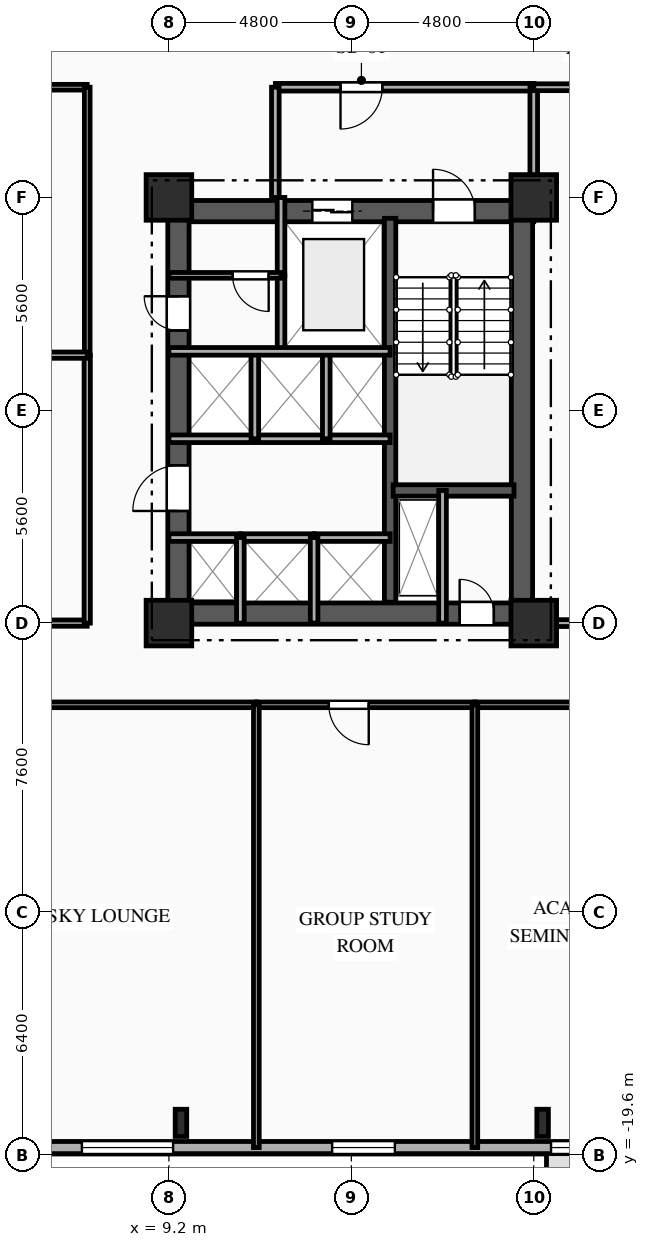
"""IFC4 building model, lengths in metres.
Left out: names, types, materials, properties, quantities, classifications, styles, units other than length and angle.
Written with IfcOpenShell. Run it as: python <this file> out.ifc"""

import sys

from ifc_helpers import new_model, si_unit, direction, frame, frame_2d, origin, origin_2d, place, context, subcontext, project, spatial, rectangle, i_section, extrude, element, fill, save


model = new_model("IFC4")
c1 = context("Model", 3, precision=1e-05, world=origin(), true_north=direction((0.0, 1.0)))
c2 = subcontext(c1, "Body", "Model", "MODEL_VIEW")
j1 = project(units=[si_unit("LENGTHUNIT", "METRE"), si_unit("PLANEANGLEUNIT", "RADIAN")], contexts=[c1])
p1 = place(None, origin())
s1 = spatial("IfcSite", under=j1, at=p1, CompositionType="ELEMENT")
p2 = place(p1, origin())
s2 = spatial("IfcBuilding", under=s1, at=p2, CompositionType="ELEMENT")
p3 = place(p2, frame((0.0, 0.0, 50.45)))
s3 = spatial("IfcBuildingStorey", under=s2, at=p3, CompositionType="ELEMENT", Elevation=50.45)
for number, where, z_axis, x_axis in (
    (1, (9.2, -5.6, 0.0), (0.0, 0.0, 1.0), (1.0, 0.0, 0.0)),
    (2, (9.2, 5.6, 0.0), (0.0, 0.0, 1.0), (1.0, 0.0, 0.0)),
    (3, (18.8, -5.6, 0.0), (0.0, 0.0, 1.0), (1.0, 0.0, 0.0)),
    (4, (18.8, 5.6, 0.0), (0.0, 0.0, 1.0), (1.0, 0.0, 0.0)),
):
    element("IfcColumn", number, at=place(p3, frame(where, z_axis=z_axis, x_axis=x_axis)), inside=s3, PredefinedType="COLUMN", context=c2, shape_type="SweptSolid", body=[
        extrude(rectangle(XDim=1.2, YDim=1.2, at=origin_2d()), origin(), (0.0, 0.0, 1.0), 3.35),
    ])
for number, where, z_axis, x_axis in (
    (5, (9.517, -18.75, 0.0), (0.0, 0.0, 1.0), (1.0, 0.0, 0.0)),
    (6, (19.033, -18.75, 0.0), (0.0, 0.0, 1.0), (1.0, 0.0, 0.0)),
):
    element("IfcColumn", number, at=place(p3, frame(where, z_axis=z_axis, x_axis=x_axis)), inside=s3, PredefinedType="COLUMN", context=c2, shape_type="SweptSolid", body=[
        extrude(i_section(OverallWidth=0.304, OverallDepth=0.716, WebThickness=0.021, FlangeThickness=0.04, FilletRadius=0.027, at=origin_2d()), origin(), (0.0, 0.0, 1.0), 3.35),
    ])
p4 = place(p3, frame((29.2, -19.4, 0.0), z_axis=(0.0, 0.0, 1.0), x_axis=(-1.0, 0.0, 0.0)))
e7 = element("IfcWall", 7, at=p4, inside=s3, PredefinedType="SOLIDWALL", context=c2, shape_type="SweptSolid", body=[
    extrude(rectangle(XDim=23.6, YDim=0.32, at=frame_2d((11.8, 0.0))), origin(), (0.0, 0.0, 1.0), 3.035),
])
p5 = place(p4, frame((8.295, 0.0, 0.85)))
e8 = element("IfcOpeningElement", 8, at=p5, cuts=e7, PredefinedType="OPENING", context=c2, shape_type="SweptSolid", body=[
    extrude(rectangle(XDim=1.65, YDim=1.85, at=frame_2d((0.825, 0.925))), frame((0.0, 0.17, 0.0), z_axis=(0.0, -1.0, 0.0), x_axis=(1.0, 0.0, 0.0)), (0.0, 0.0, 1.0), 0.34),
])
p6 = place(p4, frame((14.055, 0.0, 0.85)))
e9 = element("IfcOpeningElement", 9, at=p6, cuts=e7, PredefinedType="OPENING", context=c2, shape_type="SweptSolid", body=[
    extrude(rectangle(XDim=1.65, YDim=1.85, at=frame_2d((0.825, 0.925))), frame((0.0, 0.17, 0.0), z_axis=(0.0, -1.0, 0.0), x_axis=(1.0, 0.0, 0.0)), (0.0, 0.0, 1.0), 0.34),
])
p7 = place(p4, frame((19.89, 0.0, 0.85)))
e10 = element("IfcOpeningElement", 10, at=p7, cuts=e7, PredefinedType="OPENING", context=c2, shape_type="SweptSolid", body=[
    extrude(rectangle(XDim=2.4, YDim=1.95, at=frame_2d((1.2, 0.975))), frame((0.0, 0.17, 0.0), z_axis=(0.0, -1.0, 0.0), x_axis=(1.0, 0.0, 0.0)), (0.0, 0.0, 1.0), 0.34),
])
p8 = place(p3, frame((9.2, 5.24, 0.0), z_axis=(0.0, 0.0, 1.0), x_axis=(1.0, 0.0, 0.0)))
e11 = element("IfcWall", 11, at=p8, inside=s3, PredefinedType="SHEAR", context=c2, shape_type="SweptSolid", body=[
    extrude(rectangle(XDim=9.6, YDim=0.56, at=frame_2d((4.8, 0.0))), origin(), (0.0, 0.0, 1.0), 3.035),
])
p9 = place(p8, frame((6.95, 0.0, 0.0)))
e12 = element("IfcOpeningElement", 12, at=p9, cuts=e11, PredefinedType="OPENING", context=c2, shape_type="SweptSolid", body=[
    extrude(rectangle(XDim=1.1, YDim=2.15, at=frame_2d((0.55, 1.075))), frame((0.0, 0.29, 0.0), z_axis=(0.0, -1.0, 0.0), x_axis=(1.0, 0.0, 0.0)), (0.0, 0.0, 1.0), 0.58),
])
p10 = place(p8, frame((3.775, 0.0, 0.0)))
e13 = element("IfcOpeningElement", 13, at=p10, cuts=e11, PredefinedType="OPENING", context=c2, shape_type="SweptSolid", body=[
    extrude(rectangle(XDim=1.05, YDim=2.1, at=frame_2d((0.525, 1.05))), frame((0.0, 0.29, 0.0), z_axis=(0.0, -1.0, 0.0), x_axis=(1.0, 0.0, 0.0)), (0.0, 0.0, 1.0), 0.58),
])
p11 = place(p3, frame((9.2, -5.35, 0.0), z_axis=(0.0, 0.0, 1.0), x_axis=(1.0, 0.0, 0.0)))
e14 = element("IfcWall", 14, at=p11, inside=s3, PredefinedType="SHEAR", context=c2, shape_type="SweptSolid", body=[
    extrude(rectangle(XDim=9.6, YDim=0.56, at=frame_2d((4.8, 0.0))), origin(), (0.0, 0.0, 1.0), 3.035),
])
p12 = place(p11, frame((7.65, 0.0, 0.0)))
e15 = element("IfcOpeningElement", 15, at=p12, cuts=e14, PredefinedType="OPENING", context=c2, shape_type="SweptSolid", body=[
    extrude(rectangle(XDim=0.9, YDim=2.1, at=frame_2d((0.45, 1.05))), frame((0.0, 0.29, 0.0), z_axis=(0.0, -1.0, 0.0), x_axis=(1.0, 0.0, 0.0)), (0.0, 0.0, 1.0), 0.58),
])
p13 = place(p3, frame((9.45, -5.05, 0.0), z_axis=(0.0, 0.0, 1.0), x_axis=(0.0, 1.0, 0.0)))
e16 = element("IfcWall", 16, at=p13, inside=s3, PredefinedType="SHEAR", context=c2, shape_type="SweptSolid", body=[
    extrude(rectangle(XDim=10.1, YDim=0.56, at=frame_2d((5.05, 0.0))), origin(), (0.0, 0.0, 1.0), 3.035),
])
p14 = place(p13, frame((7.15, 0.0, 0.0)))
e17 = element("IfcOpeningElement", 17, at=p14, cuts=e16, PredefinedType="OPENING", context=c2, shape_type="SweptSolid", body=[
    extrude(rectangle(XDim=0.9, YDim=2.1, at=frame_2d((0.45, 1.05))), frame((0.0, 0.29, 0.0), z_axis=(0.0, -1.0, 0.0), x_axis=(1.0, 0.0, 0.0)), (0.0, 0.0, 1.0), 0.58),
])
p15 = place(p13, frame((2.4, 0.0, 0.0)))
e18 = element("IfcOpeningElement", 18, at=p15, cuts=e16, PredefinedType="OPENING", context=c2, shape_type="SweptSolid", body=[
    extrude(rectangle(XDim=1.2, YDim=2.15, at=frame_2d((0.6, 1.075))), frame((0.0, 0.29, 0.0), z_axis=(0.0, -1.0, 0.0), x_axis=(1.0, 0.0, 0.0)), (0.0, 0.0, 1.0), 0.58),
])
p16 = place(p3, frame((18.49, -5.05, 0.0), z_axis=(0.0, 0.0, 1.0), x_axis=(0.0, 1.0, 0.0)))
e19 = element("IfcWall", 19, at=p16, inside=s3, PredefinedType="SHEAR", context=c2, shape_type="SweptSolid", body=[
    extrude(rectangle(XDim=10.1, YDim=0.56, at=frame_2d((5.05, 0.0))), origin(), (0.0, 0.0, 1.0), 3.035),
])
p17 = place(p3, frame((15.02, -5.05, 0.0), z_axis=(0.0, 0.0, 1.0), x_axis=(0.0, 1.0, 0.0)))
e20 = element("IfcWall", 20, at=p17, inside=s3, PredefinedType="SHEAR", context=c2, shape_type="SweptSolid", body=[
    extrude(rectangle(XDim=10.1, YDim=0.3, at=frame_2d((5.05, 0.0))), origin(), (0.0, 0.0, 1.0), 3.035),
])
p18 = place(p3, frame((15.1, -2.11, 0.0), z_axis=(0.0, 0.0, 1.0), x_axis=(1.0, 0.0, 0.0)))
e21 = element("IfcWall", 21, at=p18, inside=s3, PredefinedType="SHEAR", context=c2, shape_type="SweptSolid", body=[
    extrude(rectangle(XDim=3.18, YDim=0.3, at=frame_2d((1.59, 0.0))), origin(), (0.0, 0.0, 1.0), 3.035),
])
p19 = place(p3, frame((16.4, -2.11, 0.0), z_axis=(0.0, 0.0, 1.0), x_axis=(0.0, -1.0, 0.0)))
e22 = element("IfcWall", 22, at=p19, inside=s3, PredefinedType="PARTITIONING", context=c2, shape_type="SweptSolid", body=[
    extrude(rectangle(XDim=3.49, YDim=0.2, at=frame_2d((1.745, 0.0))), origin(), (0.0, 0.0, 1.0), 3.035),
])
p20 = place(p3, frame((12.15, 3.55, 0.0), z_axis=(0.0, 0.0, 1.0), x_axis=(0.0, -1.0, 0.0)))
e23 = element("IfcWall", 23, at=p20, inside=s3, PredefinedType="PARTITIONING", context=c2, shape_type="SweptSolid", body=[
    extrude(rectangle(XDim=2.0, YDim=0.2, at=frame_2d((1.0, 0.0))), origin(), (0.0, 0.0, 1.0), 3.035),
])
p21 = place(p3, frame((12.15, 5.6, 0.0), z_axis=(0.0, 0.0, 1.0), x_axis=(0.0, -1.0, 0.0)))
e24 = element("IfcWall", 24, at=p21, inside=s3, PredefinedType="PARTITIONING", context=c2, shape_type="SweptSolid", body=[
    extrude(rectangle(XDim=2.05, YDim=0.2, at=frame_2d((1.025, 0.0))), origin(), (0.0, 0.0, 1.0), 3.035),
])
p22 = place(p3, frame((18.8, 8.5, 0.0), z_axis=(0.0, 0.0, 1.0), x_axis=(-1.0, 0.0, 0.0)))
e25 = element("IfcWall", 25, at=p22, inside=s3, PredefinedType="PARTITIONING", context=c2, shape_type="SweptSolid", body=[
    extrude(rectangle(XDim=6.8, YDim=0.2, at=frame_2d((3.4, 0.0))), origin(), (0.0, 0.0, 1.0), 3.035),
])
p23 = place(p22, frame((3.985, 0.0, 0.0)))
e26 = element("IfcOpeningElement", 26, at=p23, cuts=e25, PredefinedType="OPENING", context=c2, shape_type="SweptSolid", body=[
    extrude(rectangle(XDim=1.1, YDim=2.15, at=frame_2d((0.55, 1.075))), frame((0.0, 0.11, 0.0), z_axis=(0.0, -1.0, 0.0), x_axis=(1.0, 0.0, 0.0)), (0.0, 0.0, 1.0), 0.22),
])
p24 = place(p3, frame((12.0, 8.5, 0.0), z_axis=(0.0, 0.0, 1.0), x_axis=(0.0, -1.0, 0.0)))
e27 = element("IfcWall", 27, at=p24, inside=s3, PredefinedType="PARTITIONING", context=c2, shape_type="SweptSolid", body=[
    extrude(rectangle(XDim=2.9, YDim=0.2, at=frame_2d((1.45, 0.0))), origin(), (0.0, 0.0, 1.0), 3.035),
])
p25 = place(p3, frame((18.8, 5.6, 0.0), z_axis=(0.0, 0.0, 1.0), x_axis=(0.0, 1.0, 0.0)))
e28 = element("IfcWall", 28, at=p25, inside=s3, PredefinedType="PARTITIONING", context=c2, shape_type="SweptSolid", body=[
    extrude(rectangle(XDim=2.9, YDim=0.2, at=frame_2d((1.45, 0.0))), origin(), (0.0, 0.0, 1.0), 2.52),
])
p26 = place(p3, frame((12.15, 3.55, 0.0), z_axis=(0.0, 0.0, 1.0), x_axis=(-1.0, 0.0, 0.0)))
e29 = element("IfcWall", 29, at=p26, inside=s3, PredefinedType="PARTITIONING", context=c2, shape_type="SweptSolid", body=[
    extrude(rectangle(XDim=2.95, YDim=0.15, at=frame_2d((1.475, 0.0))), origin(), (0.0, 0.0, 1.0), 3.035),
])
p27 = place(p26, frame((0.325, 0.0, 0.0)))
e30 = element("IfcOpeningElement", 30, at=p27, cuts=e29, PredefinedType="OPENING", context=c2, shape_type="SweptSolid", body=[
    extrude(rectangle(XDim=0.95, YDim=2.1, at=frame_2d((0.475, 1.05))), frame((0.0, 0.085, 0.0), z_axis=(0.0, -1.0, 0.0), x_axis=(1.0, 0.0, 0.0)), (0.0, 0.0, 1.0), 0.17),
])
p28 = place(p3, frame((9.2, -3.35, 0.0), z_axis=(0.0, 0.0, 1.0), x_axis=(1.0, 0.0, 0.0)))
e31 = element("IfcWall", 31, at=p28, inside=s3, PredefinedType="PARTITIONING", context=c2, shape_type="SweptSolid", body=[
    extrude(rectangle(XDim=1.88, YDim=0.2, at=frame_2d((0.94, 0.0))), origin(), (0.0, 0.0, 1.0), 2.75),
])
p29 = place(p3, frame((11.08, -3.35, 0.0), z_axis=(0.0, 0.0, 1.0), x_axis=(1.0, 0.0, 0.0)))
e32 = element("IfcWall", 32, at=p29, inside=s3, PredefinedType="PARTITIONING", context=c2, shape_type="SweptSolid", body=[
    extrude(rectangle(XDim=1.94, YDim=0.2, at=frame_2d((0.97, 0.0))), origin(), (0.0, 0.0, 1.0), 3.035),
])
p30 = place(p3, frame((13.02, -3.35, 0.0), z_axis=(0.0, 0.0, 1.0), x_axis=(1.0, 0.0, 0.0)))
e33 = element("IfcWall", 33, at=p30, inside=s3, PredefinedType="PARTITIONING", context=c2, shape_type="SweptSolid", body=[
    extrude(rectangle(XDim=2.0, YDim=0.2, at=frame_2d((1.0, 0.0))), origin(), (0.0, 0.0, 1.0), 3.035),
])
p31 = place(p3, frame((11.46, -0.75, 0.0), z_axis=(0.0, 0.0, 1.0), x_axis=(-1.0, 0.0, 0.0)))
e34 = element("IfcWall", 34, at=p31, inside=s3, PredefinedType="PARTITIONING", context=c2, shape_type="SweptSolid", body=[
    extrude(rectangle(XDim=2.26, YDim=0.2, at=frame_2d((1.13, 0.0))), origin(), (0.0, 0.0, 1.0), 3.035),
])
p32 = place(p3, frame((13.34, -0.75, 0.0), z_axis=(0.0, 0.0, 1.0), x_axis=(-1.0, 0.0, 0.0)))
e35 = element("IfcWall", 35, at=p32, inside=s3, PredefinedType="PARTITIONING", context=c2, shape_type="SweptSolid", body=[
    extrude(rectangle(XDim=1.88, YDim=0.2, at=frame_2d((0.94, 0.0))), origin(), (0.0, 0.0, 1.0), 3.035),
])
p33 = place(p3, frame((15.02, -0.75, 0.0), z_axis=(0.0, 0.0, 1.0), x_axis=(-1.0, 0.0, 0.0)))
e36 = element("IfcWall", 36, at=p33, inside=s3, PredefinedType="PARTITIONING", context=c2, shape_type="SweptSolid", body=[
    extrude(rectangle(XDim=1.68, YDim=0.2, at=frame_2d((0.84, 0.0))), origin(), (0.0, 0.0, 1.0), 3.035),
])
for number, where, z_axis, x_axis in (
    (37, (11.08, -5.6, 0.0), (0.0, 0.0, 1.0), (0.0, 1.0, 0.0)),
    (38, (13.02, -5.6, 0.0), (0.0, 0.0, 1.0), (0.0, 1.0, 0.0)),
):
    element("IfcWall", number, at=place(p3, frame(where, z_axis=z_axis, x_axis=x_axis)), inside=s3, PredefinedType="PARTITIONING", context=c2, shape_type="SweptSolid", body=[
        extrude(rectangle(XDim=2.25, YDim=0.2, at=frame_2d((1.125, 0.0))), origin(), (0.0, 0.0, 1.0), 3.035),
    ])
for number, where, z_axis, x_axis in (
    (39, (11.46, -0.75, 0.0), (0.0, 0.0, 1.0), (0.0, 1.0, 0.0)),
    (40, (13.34, -0.75, 0.0), (0.0, 0.0, 1.0), (0.0, 1.0, 0.0)),
):
    element("IfcWall", number, at=place(p3, frame(where, z_axis=z_axis, x_axis=x_axis)), inside=s3, PredefinedType="PARTITIONING", context=c2, shape_type="SweptSolid", body=[
        extrude(rectangle(XDim=2.3, YDim=0.2, at=frame_2d((1.15, 0.0))), origin(), (0.0, 0.0, 1.0), 3.035),
    ])
p34 = place(p3, frame((21.45, 8.5, 0.0), z_axis=(0.0, 0.0, 1.0), x_axis=(-1.0, 0.0, 0.0)))
e41 = element("IfcWall", 41, at=p34, inside=s3, PredefinedType="PARTITIONING", context=c2, shape_type="SweptSolid", body=[
    extrude(rectangle(XDim=2.65, YDim=0.18, at=frame_2d((1.325, 0.0))), origin(), (0.0, 0.0, 1.0), 3.035),
])
p35 = place(p34, frame((0.641, 0.0, 0.0)))
e42 = element("IfcOpeningElement", 42, at=p35, cuts=e41, PredefinedType="OPENING", context=c2, shape_type="SweptSolid", body=[
    extrude(rectangle(XDim=1.0, YDim=2.15, at=frame_2d((0.5, 1.075))), frame((0.0, 0.1, 0.0), z_axis=(0.0, -1.0, 0.0), x_axis=(1.0, 0.0, 0.0)), (0.0, 0.0, 1.0), 0.2),
])
p36 = place(p3, frame((7.05, 8.5, 0.0), z_axis=(0.0, 0.0, 1.0), x_axis=(-1.0, 0.0, 0.0)))
e43 = element("IfcWall", 43, at=p36, inside=s3, PredefinedType="PARTITIONING", context=c2, shape_type="SweptSolid", body=[
    extrude(rectangle(XDim=7.05, YDim=0.15, at=frame_2d((3.525, 0.0))), origin(), (0.0, 0.0, 1.0), 3.035),
])
p37 = place(p3, frame((18.8, -5.6, 0.0), z_axis=(0.0, 0.0, 1.0), x_axis=(1.0, 0.0, 0.0)))
e44 = element("IfcWall", 44, at=p37, inside=s3, PredefinedType="PARTITIONING", context=c2, shape_type="SweptSolid", body=[
    extrude(rectangle(XDim=2.65, YDim=0.18, at=frame_2d((1.325, 0.0))), origin(), (0.0, 0.0, 1.0), 3.035),
])
p38 = place(p3, frame((11.5, -7.75, 0.0), z_axis=(0.0, 0.0, 1.0), x_axis=(-1.0, 0.0, 0.0)))
e45 = element("IfcWall", 45, at=p38, inside=s3, PredefinedType="PARTITIONING", context=c2, shape_type="SweptSolid", body=[
    extrude(rectangle(XDim=11.5, YDim=0.15, at=frame_2d((5.75, 0.0))), origin(), (0.0, 0.0, 1.0), 3.035),
])
p39 = place(p38, frame((8.709, 0.0, 0.0)))
e46 = element("IfcOpeningElement", 46, at=p39, cuts=e45, PredefinedType="OPENING", context=c2, shape_type="SweptSolid", body=[
    extrude(rectangle(XDim=1.05, YDim=2.15, at=frame_2d((0.525, 1.075))), frame((0.0, 0.085, 0.0), z_axis=(0.0, -1.0, 0.0), x_axis=(1.0, 0.0, 0.0)), (0.0, 0.0, 1.0), 0.17),
])
p40 = place(p3, frame((17.25, -7.75, 0.0), z_axis=(0.0, 0.0, 1.0), x_axis=(-1.0, 0.0, 0.0)))
e47 = element("IfcWall", 47, at=p40, inside=s3, PredefinedType="PARTITIONING", context=c2, shape_type="SweptSolid", body=[
    extrude(rectangle(XDim=5.75, YDim=0.15, at=frame_2d((2.875, 0.0))), origin(), (0.0, 0.0, 1.0), 3.035),
])
p41 = place(p40, frame((2.792, 0.0, 0.0)))
e48 = element("IfcOpeningElement", 48, at=p41, cuts=e47, PredefinedType="OPENING", context=c2, shape_type="SweptSolid", body=[
    extrude(rectangle(XDim=1.05, YDim=2.15, at=frame_2d((0.525, 1.075))), frame((0.0, 0.085, 0.0), z_axis=(0.0, -1.0, 0.0), x_axis=(1.0, 0.0, 0.0)), (0.0, 0.0, 1.0), 0.17),
])
p42 = place(p3, frame((23.0, -7.75, 0.0), z_axis=(0.0, 0.0, 1.0), x_axis=(-1.0, 0.0, 0.0)))
e49 = element("IfcWall", 49, at=p42, inside=s3, PredefinedType="PARTITIONING", context=c2, shape_type="SweptSolid", body=[
    extrude(rectangle(XDim=5.75, YDim=0.15, at=frame_2d((2.875, 0.0))), origin(), (0.0, 0.0, 1.0), 3.035),
])
p43 = place(p42, frame((1.022, 0.0, 0.0)))
e50 = element("IfcOpeningElement", 50, at=p43, cuts=e49, PredefinedType="OPENING", context=c2, shape_type="SweptSolid", body=[
    extrude(rectangle(XDim=1.05, YDim=2.15, at=frame_2d((0.525, 1.075))), frame((0.0, 0.085, 0.0), z_axis=(0.0, -1.0, 0.0), x_axis=(1.0, 0.0, 0.0)), (0.0, 0.0, 1.0), 0.17),
])
p44 = place(p3, frame((0.0, -5.6, 0.0), z_axis=(0.0, 0.0, 1.0), x_axis=(1.0, 0.0, 0.0)))
e51 = element("IfcWall", 51, at=p44, inside=s3, PredefinedType="PARTITIONING", context=c2, shape_type="SweptSolid", body=[
    extrude(rectangle(XDim=7.05, YDim=0.165, at=frame_2d((3.525, 0.0))), origin(), (0.0, 0.0, 1.0), 2.52),
])
p45 = place(p3, frame((7.05, -5.6, 0.0), z_axis=(0.0, 0.0, 1.0), x_axis=(0.0, 1.0, 0.0)))
e52 = element("IfcWall", 52, at=p45, inside=s3, PredefinedType="PARTITIONING", context=c2, shape_type="SweptSolid", body=[
    extrude(rectangle(XDim=7.05, YDim=0.165, at=frame_2d((3.525, 0.0))), origin(), (0.0, 0.0, 1.0), 3.035),
])
p46 = place(p3, frame((7.05, 1.45, 0.0), z_axis=(0.0, 0.0, 1.0), x_axis=(0.0, 1.0, 0.0)))
e53 = element("IfcWall", 53, at=p46, inside=s3, PredefinedType="PARTITIONING", context=c2, shape_type="SweptSolid", body=[
    extrude(rectangle(XDim=7.05, YDim=0.15, at=frame_2d((3.525, 0.0))), origin(), (0.0, 0.0, 1.0), 3.035),
])
for number, where, z_axis, x_axis in (
    (54, (11.5, -7.75, 0.0), (0.0, 0.0, 1.0), (0.0, -1.0, 0.0)),
    (55, (17.25, -7.75, 0.0), (0.0, 0.0, 1.0), (0.0, -1.0, 0.0)),
):
    element("IfcWall", number, at=place(p3, frame(where, z_axis=z_axis, x_axis=x_axis)), inside=s3, PredefinedType="PARTITIONING", context=c2, shape_type="SweptSolid", body=[
        extrude(rectangle(XDim=11.65, YDim=0.15, at=frame_2d((5.825, 0.0))), origin(), (0.0, 0.0, 1.0), 3.035),
    ])
p47 = place(p3, frame((-7.05, 1.45, 0.0), z_axis=(0.0, 0.0, 1.0), x_axis=(1.0, 0.0, 0.0)))
e56 = element("IfcWall", 56, at=p47, inside=s3, PredefinedType="PARTITIONING", context=c2, shape_type="SweptSolid", body=[
    extrude(rectangle(XDim=14.1, YDim=0.165, at=frame_2d((7.05, 0.0))), origin(), (0.0, 0.0, 1.0), 3.035),
])
p48 = place(p3, frame((9.2, 1.55, 0.0), z_axis=(0.0, 0.0, 1.0), x_axis=(1.0, 0.0, 0.0)))
e57 = element("IfcWall", 57, at=p48, inside=s3, PredefinedType="PARTITIONING", context=c2, shape_type="SweptSolid", body=[
    extrude(rectangle(XDim=5.82, YDim=0.2, at=frame_2d((2.91, 0.0))), origin(), (0.0, 0.0, 1.0), 3.035),
])
p49 = place(p5, origin())
e58 = element("IfcWindow", 58, at=p49, inside=s3, PartitioningType="SINGLE_PANEL", PredefinedType="WINDOW", context=c2, shape_type="SweptSolid", body=[
    extrude(rectangle(XDim=1.65, YDim=1.85, at=frame_2d((0.825, 0.925))), frame((0.0, 0.03, 0.0), z_axis=(0.0, -1.0, 0.0), x_axis=(1.0, 0.0, 0.0)), (0.0, 0.0, 1.0), 0.06),
])
fill(e8, e58)
p50 = place(p6, origin())
e59 = element("IfcWindow", 59, at=p50, inside=s3, PartitioningType="SINGLE_PANEL", PredefinedType="WINDOW", context=c2, shape_type="SweptSolid", body=[
    extrude(rectangle(XDim=1.65, YDim=1.85, at=frame_2d((0.825, 0.925))), frame((0.0, 0.03, 0.0), z_axis=(0.0, -1.0, 0.0), x_axis=(1.0, 0.0, 0.0)), (0.0, 0.0, 1.0), 0.06),
])
fill(e9, e59)
p51 = place(p7, origin())
e60 = element("IfcWindow", 60, at=p51, inside=s3, PartitioningType="SINGLE_PANEL", PredefinedType="WINDOW", context=c2, shape_type="SweptSolid", body=[
    extrude(rectangle(XDim=2.4, YDim=1.95, at=frame_2d((1.2, 0.975))), frame((0.0, 0.03, 0.0), z_axis=(0.0, -1.0, 0.0), x_axis=(1.0, 0.0, 0.0)), (0.0, 0.0, 1.0), 0.06),
])
fill(e10, e60)
p52 = place(p9, origin())
e61 = element("IfcDoor", 61, at=p52, inside=s3, OperationType="SINGLE_SWING_LEFT", PredefinedType="DOOR", context=c2, shape_type="SweptSolid", body=[
    extrude(rectangle(XDim=1.1, YDim=2.15, at=frame_2d((0.55, 1.075))), frame((0.0, 0.025, 0.0), z_axis=(0.0, -1.0, 0.0), x_axis=(1.0, 0.0, 0.0)), (0.0, 0.0, 1.0), 0.05),
])
fill(e12, e61)
p53 = place(p10, origin())
e62 = element("IfcDoor", 62, at=p53, inside=s3, OperationType="DOUBLE_DOOR_SLIDING", PredefinedType="DOOR", context=c2, shape_type="SweptSolid", body=[
    extrude(rectangle(XDim=1.05, YDim=2.1, at=frame_2d((0.525, 1.05))), frame((0.0, 0.025, 0.0), z_axis=(0.0, -1.0, 0.0), x_axis=(1.0, 0.0, 0.0)), (0.0, 0.0, 1.0), 0.05),
])
fill(e13, e62)
p54 = place(p12, origin())
e63 = element("IfcDoor", 63, at=p54, inside=s3, OperationType="SINGLE_SWING_LEFT", PredefinedType="DOOR", context=c2, shape_type="SweptSolid", body=[
    extrude(rectangle(XDim=0.9, YDim=2.1, at=frame_2d((0.45, 1.05))), frame((0.0, 0.025, 0.0), z_axis=(0.0, -1.0, 0.0), x_axis=(1.0, 0.0, 0.0)), (0.0, 0.0, 1.0), 0.05),
])
fill(e15, e63)
p55 = place(p23, origin())
e64 = element("IfcDoor", 64, at=p55, inside=s3, OperationType="SINGLE_SWING_RIGHT", PredefinedType="DOOR", context=c2, shape_type="SweptSolid", body=[
    extrude(rectangle(XDim=1.1, YDim=2.15, at=frame_2d((0.55, 1.075))), frame((0.0, 0.025, 0.0), z_axis=(0.0, -1.0, 0.0), x_axis=(1.0, 0.0, 0.0)), (0.0, 0.0, 1.0), 0.05),
])
fill(e26, e64)
p56 = place(p27, origin())
e65 = element("IfcDoor", 65, at=p56, inside=s3, OperationType="SINGLE_SWING_LEFT", PredefinedType="DOOR", context=c2, shape_type="SweptSolid", body=[
    extrude(rectangle(XDim=0.95, YDim=2.1, at=frame_2d((0.475, 1.05))), frame((0.0, 0.025, 0.0), z_axis=(0.0, -1.0, 0.0), x_axis=(1.0, 0.0, 0.0)), (0.0, 0.0, 1.0), 0.05),
])
fill(e30, e65)
p57 = place(p14, origin())
e66 = element("IfcDoor", 66, at=p57, inside=s3, OperationType="SINGLE_SWING_RIGHT", PredefinedType="DOOR", context=c2, shape_type="SweptSolid", body=[
    extrude(rectangle(XDim=0.9, YDim=2.1, at=frame_2d((0.45, 1.05))), frame((0.0, 0.025, 0.0), z_axis=(0.0, -1.0, 0.0), x_axis=(1.0, 0.0, 0.0)), (0.0, 0.0, 1.0), 0.05),
])
fill(e17, e66)
p58 = place(p15, origin())
e67 = element("IfcDoor", 67, at=p58, inside=s3, OperationType="SINGLE_SWING_LEFT", PredefinedType="DOOR", context=c2, shape_type="SweptSolid", body=[
    extrude(rectangle(XDim=1.2, YDim=2.15, at=frame_2d((0.6, 1.075))), frame((0.0, 0.025, 0.0), z_axis=(0.0, -1.0, 0.0), x_axis=(1.0, 0.0, 0.0)), (0.0, 0.0, 1.0), 0.05),
])
fill(e18, e67)
p59 = place(p41, origin())
e68 = element("IfcDoor", 68, at=p59, inside=s3, OperationType="SINGLE_SWING_LEFT", PredefinedType="DOOR", context=c2, shape_type="SweptSolid", body=[
    extrude(rectangle(XDim=1.05, YDim=2.15, at=frame_2d((0.525, 1.075))), frame((0.0, 0.025, 0.0), z_axis=(0.0, -1.0, 0.0), x_axis=(1.0, 0.0, 0.0)), (0.0, 0.0, 1.0), 0.05),
])
fill(e48, e68)
save(model, sys.argv[1])
